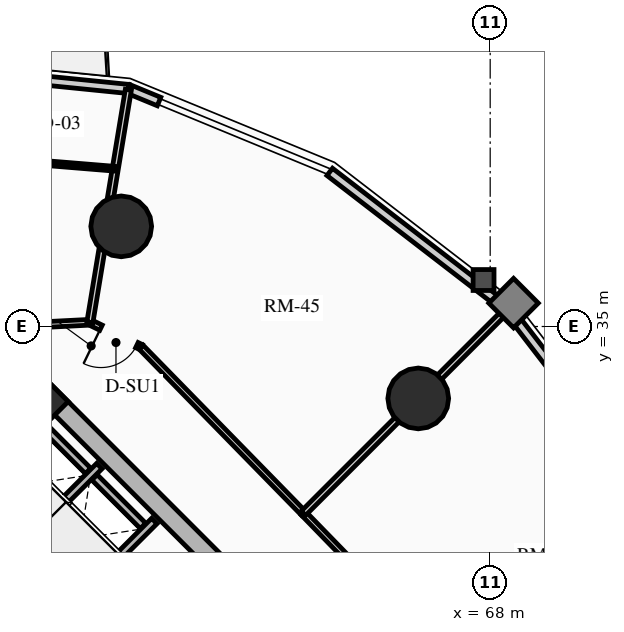
"""IFC4 building model, lengths in metres.
Left out: names, types, materials, properties, quantities, classifications, styles, units other than length and angle.
Written with IfcOpenShell. Run it as: python <this file> out.ifc"""

import sys

from ifc_helpers import new_model, si_unit, direction, frame, frame_2d, origin, origin_2d, place, context, subcontext, project, spatial, rectangle, circle, extrude, source, transform, mapped, element, fill, save


model = new_model("IFC4")
c1 = context("Model", 3, precision=1e-05, world=origin(), true_north=direction((0.0, 1.0)))
c2 = subcontext(c1, "Body", "Model", "MODEL_VIEW")
j1 = project(units=[si_unit("LENGTHUNIT", "METRE"), si_unit("PLANEANGLEUNIT", "RADIAN")], contexts=[c1])
p1 = place(None, origin())
s1 = spatial("IfcSite", under=j1, at=p1, CompositionType="ELEMENT")
p2 = place(p1, origin())
s2 = spatial("IfcBuilding", under=s1, at=p2, CompositionType="ELEMENT")
p3 = place(p2, frame((0.0, 0.0, 39.46)))
s3 = spatial("IfcBuildingStorey", under=s2, at=p3, CompositionType="ELEMENT", Elevation=39.46)
p4 = place(p3, frame((66.339, 23.227, 0.0), z_axis=(0.0, 0.0, 1.0), x_axis=(-0.707106781187, 0.707106781187, 0.0)))
e1 = element("IfcWall", 1, at=p4, inside=s3, PredefinedType="SHEAR", context=c2, shape_type="SweptSolid", body=[
    extrude(rectangle(XDim=14.3, YDim=0.5, at=frame_2d((7.15, 0.0))), origin(), (0.0, 0.0, 1.0), 2.91),
])
p5 = place(p3, frame((48.838, 25.596, 0.0), z_axis=(0.0, 0.0, 1.0), x_axis=(0.707106781187, 0.707106781187, 0.0)))
e2 = element("IfcWall", 2, at=p5, inside=s3, PredefinedType="SHEAR", context=c2, shape_type="SweptSolid", body=[
    extrude(rectangle(XDim=10.7, YDim=0.5, at=frame_2d((5.35, 0.0))), origin(), (0.0, 0.0, 1.0), 2.91),
])
m1 = source(origin(), c2, "Body", "SweptSolid", [
    extrude(rectangle(XDim=1.5, YDim=2.02, at=frame_2d((0.75, 1.01))), frame((0.0, 0.26, 0.0), z_axis=(0.0, -1.0, 0.0), x_axis=(1.0, 0.0, 0.0)), (0.0, 0.0, 1.0), 0.52),
])
p6 = place(p5, frame((4.6, 0.0, 0.0)))
e3 = element("IfcOpeningElement", 3, at=p6, cuts=e2, PredefinedType="OPENING", context=c2, shape_type="MappedRepresentation", body=[
    mapped(m1, transform((0.0, 0.0, 0.0), x_axis=(1.0, 0.0, 0.0), y_axis=(0.0, 1.0, 0.0), z_axis=(0.0, 0.0, 1.0), scale=1.0)),
])
p7 = place(p3, frame((63.662, 20.904, 0.0), z_axis=(0.0, 0.0, 1.0), x_axis=(-0.707106781187, 0.707106781187, 0.0)))
e4 = element("IfcWall", 4, at=p7, inside=s3, PredefinedType="SHEAR", context=c2, shape_type="SweptSolid", body=[
    extrude(rectangle(XDim=13.8, YDim=0.35, at=frame_2d((6.9, 0.0))), origin(), (0.0, 0.0, 1.0), 2.91),
])
m2 = source(origin(), c2, "Body", "SweptSolid", [
    extrude(rectangle(XDim=1.1, YDim=2.015, at=frame_2d((0.55, 1.007))), frame((0.0, 0.185, 0.0), z_axis=(0.0, -1.0, 0.0), x_axis=(1.0, 0.0, 0.0)), (0.0, 0.0, 1.0), 0.37),
])
p8 = place(p7, frame((10.025, 0.0, 0.0)))
e5 = element("IfcOpeningElement", 5, at=p8, cuts=e4, PredefinedType="OPENING", context=c2, shape_type="MappedRepresentation", body=[
    mapped(m2, transform((0.0, 0.0, 0.0), x_axis=(1.0, 0.0, 0.0), y_axis=(0.0, 1.0, 0.0), z_axis=(0.0, 0.0, 1.0), scale=1.0)),
])
p9 = place(p7, frame((12.025, 0.0, 0.0)))
e6 = element("IfcOpeningElement", 6, at=p9, cuts=e4, PredefinedType="OPENING", context=c2, shape_type="MappedRepresentation", body=[
    mapped(m2, transform((0.0, 0.0, 0.0), x_axis=(1.0, 0.0, 0.0), y_axis=(0.0, 1.0, 0.0), z_axis=(0.0, 0.0, 1.0), scale=1.0)),
])
m3 = source(origin(), c2, "Body", "SweptSolid", [
    extrude(rectangle(XDim=1.15, YDim=2.02, at=frame_2d((0.575, 1.01))), frame((0.0, 0.185, 0.0), z_axis=(0.0, -1.0, 0.0), x_axis=(1.0, 0.0, 0.0)), (0.0, 0.0, 1.0), 0.37),
])
p10 = place(p7, frame((5.33, 0.0, 0.0)))
e7 = element("IfcOpeningElement", 7, at=p10, cuts=e4, PredefinedType="OPENING", context=c2, shape_type="MappedRepresentation", body=[
    mapped(m3, transform((0.0, 0.0, 0.0), x_axis=(1.0, 0.0, 0.0), y_axis=(0.0, 1.0, 0.0), z_axis=(0.0, 0.0, 1.0), scale=1.0)),
])
p11 = place(p3, frame((56.294, 33.024, 0.0), z_axis=(0.0, 0.0, 1.0), x_axis=(0.707106781187, 0.707106781187, 0.0)))
e8 = element("IfcColumn", 8, at=p11, inside=s3, PredefinedType="COLUMN", context=c2, shape_type="SweptSolid", body=[
    extrude(rectangle(XDim=0.85, YDim=0.85, at=origin_2d()), origin(), (0.0, 0.0, 1.0), 2.91),
])
for number, where, z_axis, x_axis in (
    (9, (66.107, 33.107, 0.0), (0.0, 0.0, 1.0), (1.0, 0.0, 0.0)),
    (10, (58.291, 37.635, 0.0), (0.0, 0.0, 1.0), (1.0, 0.0, 0.0)),
):
    element("IfcColumn", number, at=place(p3, frame(where, z_axis=z_axis, x_axis=x_axis)), inside=s3, PredefinedType="USERDEFINED", context=c2, shape_type="SweptSolid", body=[
        extrude(circle(Radius=0.8, at=origin_2d()), origin(), (0.0, 0.0, 1.0), 2.91),
    ])
p12 = place(p3, frame((63.778, 39.068, 0.0), z_axis=(0.0, 0.0, 1.0), x_axis=(0.792020182601, -0.610494906082, 0.0)))
e11 = element("IfcWall", 11, at=p12, inside=s3, PredefinedType="SOLIDWALL", context=c2, shape_type="SweptSolid", body=[
    extrude(rectangle(XDim=5.911, YDim=0.24, at=frame_2d((2.956, 0.0))), origin(), (0.0, 0.0, 1.0), 2.073),
])
p13 = place(p3, frame((58.482, 41.251, 0.0), z_axis=(0.0, 0.0, 1.0), x_axis=(0.924556017656, -0.381046152345, 0.0)))
e12 = element("IfcWall", 12, at=p13, inside=s3, PredefinedType="SOLIDWALL", context=c2, shape_type="SweptSolid", body=[
    extrude(rectangle(XDim=0.87, YDim=0.24, at=frame_2d((0.435, 0.0))), origin(), (0.0, 0.0, 1.0), 2.073),
])
p14 = place(p3, frame((53.09, 41.794, 0.0), z_axis=(0.0, 0.0, 1.0), x_axis=(0.994968263437, -0.100190592135, 0.0)))
e13 = element("IfcWall", 13, at=p14, inside=s3, PredefinedType="SOLIDWALL", context=c2, shape_type="SweptSolid", body=[
    extrude(rectangle(XDim=5.419, YDim=0.24, at=frame_2d((2.71, 0.0))), origin(), (0.0, 0.0, 1.0), 2.073),
])
m4 = source(origin(), c2, "Body", "SweptSolid", [
    extrude(rectangle(XDim=1.15, YDim=2.005, at=frame_2d((0.575, 1.002))), frame((0.0, 0.13, 0.0), z_axis=(0.0, -1.0, 0.0), x_axis=(1.0, 0.0, 0.0)), (0.0, 0.0, 1.0), 0.26),
])
p15 = place(p14, frame((2.135, 0.0, 0.0)))
e14 = element("IfcOpeningElement", 14, at=p15, cuts=e13, PredefinedType="OPENING", context=c2, shape_type="MappedRepresentation", body=[
    mapped(m4, transform((0.0, 0.0, 0.0), x_axis=(1.0, 0.0, 0.0), y_axis=(0.0, 1.0, 0.0), z_axis=(0.0, 0.0, 1.0), scale=1.0)),
])
p16 = place(p3, frame((68.459, 35.459, 0.0), z_axis=(0.0, 0.0, 1.0), x_axis=(0.610494906082, -0.792020182601, 0.0)))
e15 = element("IfcWall", 15, at=p16, inside=s3, PredefinedType="SOLIDWALL", context=c2, shape_type="SweptSolid", body=[
    extrude(rectangle(XDim=5.911, YDim=0.24, at=frame_2d((2.956, 0.0))), origin(), (0.0, 0.0, 1.0), 2.073),
])
m5 = source(origin(), c2, "Body", "SweptSolid", [
    extrude(rectangle(XDim=2.2, YDim=1.35, at=frame_2d((1.1, 0.675))), frame((0.0, 0.13, 0.0), z_axis=(0.0, -1.0, 0.0), x_axis=(1.0, 0.0, 0.0)), (0.0, 0.0, 1.0), 0.26),
])
p17 = place(p16, frame((1.855, 0.0, 0.65)))
e16 = element("IfcOpeningElement", 16, at=p17, cuts=e15, PredefinedType="OPENING", context=c2, shape_type="MappedRepresentation", body=[
    mapped(m5, transform((0.0, 0.0, 0.0), x_axis=(1.0, 0.0, 0.0), y_axis=(0.0, 1.0, 0.0), z_axis=(0.0, 0.0, 1.0), scale=1.0)),
])
p18 = place(p3, frame((57.062, 27.781, 0.0), z_axis=(0.0, 0.0, 1.0), x_axis=(0.707106781187, 0.707106781187, 0.0)))
e17 = element("IfcWall", 17, at=p18, inside=s3, PredefinedType="SHEAR", context=c2, shape_type="SweptSolid", body=[
    extrude(rectangle(XDim=2.97, YDim=0.2, at=frame_2d((1.485, 0.0))), origin(), (0.0, 0.0, 1.0), 2.91),
])
p19 = place(p3, frame((55.615, 29.227, 0.0), z_axis=(0.0, 0.0, 1.0), x_axis=(0.707147878904, 0.70706568108, 0.0)))
e18 = element("IfcWall", 18, at=p19, inside=s3, PredefinedType="SHEAR", context=c2, shape_type="SweptSolid", body=[
    extrude(rectangle(XDim=2.97, YDim=0.2, at=frame_2d((1.485, 0.0))), origin(), (0.0, 0.0, 1.0), 2.91),
])
p20 = place(p3, frame((58.865, 29.754, 0.0), z_axis=(0.0, 0.0, 1.0), x_axis=(-0.707174411312, 0.707039144592, 0.0)))
e19 = element("IfcWall", 19, at=p20, inside=s3, PredefinedType="SHEAR", context=c2, shape_type="SweptSolid", body=[
    extrude(rectangle(XDim=1.805, YDim=0.2, at=frame_2d((0.902, 0.0))), origin(), (0.0, 0.0, 1.0), 2.91),
])
p21 = place(p3, frame((57.419, 31.2, 0.0), z_axis=(0.0, 0.0, 1.0), x_axis=(-0.707032117043, 0.707181437447, 0.0)))
e20 = element("IfcWall", 20, at=p21, inside=s3, PredefinedType="SHEAR", context=c2, shape_type="SweptSolid", body=[
    extrude(rectangle(XDim=1.635, YDim=0.2, at=frame_2d((0.817, 0.0))), origin(), (0.0, 0.0, 1.0), 2.91),
])
p22 = place(p3, frame((63.086, 30.086, 0.0), z_axis=(0.0, 0.0, 1.0), x_axis=(-0.699075897379, 0.715047473741, 0.0)))
e21 = element("IfcWall", 21, at=p22, inside=s3, PredefinedType="PARTITIONING", context=c2, shape_type="SweptSolid", body=[
    extrude(rectangle(XDim=6.114, YDim=0.15, at=frame_2d((3.057, 0.0))), origin(), (0.0, 0.0, 1.0), 2.159),
])
p23 = place(p3, frame((58.812, 34.458, 0.0), z_axis=(0.0, 0.0, 1.0), x_axis=(-0.899559490277, 0.436798264021, 0.0)))
e22 = element("IfcWall", 22, at=p23, inside=s3, PredefinedType="PARTITIONING", context=c2, shape_type="SweptSolid", body=[
    extrude(rectangle(XDim=1.495, YDim=0.15, at=frame_2d((0.748, 0.0))), origin(), (0.0, 0.0, 1.0), 2.205),
])
m6 = source(origin(), c2, "Body", "SweptSolid", [
    extrude(rectangle(XDim=1.05, YDim=2.015, at=frame_2d((0.525, 1.007))), frame((0.0, 0.085, 0.0), z_axis=(0.0, -1.0, 0.0), x_axis=(1.0, 0.0, 0.0)), (0.0, 0.0, 1.0), 0.17),
])
p24 = place(p23, frame((0.12, 0.0, 0.0)))
e23 = element("IfcOpeningElement", 23, at=p24, cuts=e22, PredefinedType="OPENING", context=c2, shape_type="MappedRepresentation", body=[
    mapped(m6, transform((0.0, 0.0, 0.0), x_axis=(1.0, 0.0, 0.0), y_axis=(0.0, 1.0, 0.0), z_axis=(0.0, 0.0, 1.0), scale=1.0)),
])
p25 = place(p3, frame((57.467, 35.111, 0.0), z_axis=(0.0, 0.0, 1.0), x_axis=(-0.998691757323, -0.051134859488, 0.0)))
e24 = element("IfcWall", 24, at=p25, inside=s3, PredefinedType="PARTITIONING", context=c2, shape_type="SweptSolid", body=[
    extrude(rectangle(XDim=1.485, YDim=0.15, at=frame_2d((0.742, 0.0))), origin(), (0.0, 0.0, 1.0), 2.159),
])
p26 = place(p3, frame((67.27, 25.78, 0.0), z_axis=(0.0, 0.0, 1.0), x_axis=(-0.696847842907, 0.717218992942, 0.0)))
e25 = element("IfcWall", 25, at=p26, inside=s3, PredefinedType="PARTITIONING", context=c2, shape_type="SweptSolid", body=[
    extrude(rectangle(XDim=6.004, YDim=0.15, at=frame_2d((3.002, 0.0))), origin(), (0.0, 0.0, 1.0), 2.635),
])
m7 = source(origin(), c2, "Body", "SweptSolid", [
    extrude(rectangle(XDim=1.0, YDim=2.015, at=frame_2d((0.5, 1.007))), frame((0.0, 0.085, 0.0), z_axis=(0.0, -1.0, 0.0), x_axis=(1.0, 0.0, 0.0)), (0.0, 0.0, 1.0), 0.17),
])
p27 = place(p26, frame((2.502, 0.0, 0.0)))
e26 = element("IfcOpeningElement", 26, at=p27, cuts=e25, PredefinedType="OPENING", context=c2, shape_type="MappedRepresentation", body=[
    mapped(m7, transform((0.0, 0.0, 0.0), x_axis=(1.0, 0.0, 0.0), y_axis=(0.0, 1.0, 0.0), z_axis=(0.0, 0.0, 1.0), scale=1.0)),
])
p28 = place(p3, frame((63.086, 30.086, 0.0), z_axis=(0.0, 0.0, 1.0), x_axis=(0.707106781187, 0.707106781187, 0.0)))
e27 = element("IfcWall", 27, at=p28, inside=s3, PredefinedType="PARTITIONING", context=c2, shape_type="SweptSolid", body=[
    extrude(rectangle(XDim=7.579, YDim=0.16, at=frame_2d((3.79, 0.0))), origin(), (0.0, 0.0, 1.0), 2.073),
])
p29 = place(p3, frame((57.467, 35.111, 0.0), z_axis=(0.0, 0.0, 1.0), x_axis=(0.163141505202, 0.986602680556, 0.0)))
e28 = element("IfcWall", 28, at=p29, inside=s3, PredefinedType="PARTITIONING", context=c2, shape_type="SweptSolid", body=[
    extrude(rectangle(XDim=6.203, YDim=0.16, at=frame_2d((3.102, 0.0))), origin(), (0.0, 0.0, 1.0), 2.073),
])
p30 = place(p3, frame((58.135, 39.15, 0.0), z_axis=(0.0, 0.0, 1.0), x_axis=(-0.996661360768, 0.081646383578, 0.0)))
e29 = element("IfcWall", 29, at=p30, inside=s3, PredefinedType="PARTITIONING", context=c2, shape_type="SweptSolid", body=[
    extrude(rectangle(XDim=4.073, YDim=0.125, at=frame_2d((2.036, 0.0))), origin(), (0.0, 0.0, 1.0), 2.635),
])
m8 = source(origin(), c2, "Body", "SweptSolid", [
    extrude(rectangle(XDim=0.9, YDim=2.005, at=frame_2d((0.45, 1.002))), frame((0.0, 0.073, 0.0), z_axis=(0.0, -1.0, 0.0), x_axis=(1.0, 0.0, 0.0)), (0.0, 0.0, 1.0), 0.145),
])
p31 = place(p30, frame((2.869, 0.0, 0.0)))
e30 = element("IfcOpeningElement", 30, at=p31, cuts=e29, PredefinedType="OPENING", context=c2, shape_type="MappedRepresentation", body=[
    mapped(m8, transform((0.0, 0.0, 0.0), x_axis=(1.0, 0.0, 0.0), y_axis=(0.0, 1.0, 0.0), z_axis=(0.0, 0.0, 1.0), scale=1.0)),
])
m9 = source(origin(), c2, "Body", "SweptSolid", [
    extrude(rectangle(XDim=1.05, YDim=2.015, at=frame_2d((0.525, 1.007))), frame((0.0, 0.025, 0.0), z_axis=(0.0, -1.0, 0.0), x_axis=(1.0, 0.0, 0.0)), (0.0, 0.0, 1.0), 0.05),
])
p32 = place(p24, origin())
e31 = element("IfcDoor", 31, at=p32, inside=s3, OperationType="SINGLE_SWING_RIGHT", PredefinedType="DOOR", context=c2, shape_type="MappedRepresentation", body=[
    mapped(m9, transform((0.0, 0.0, 0.0), x_axis=(1.0, 0.0, 0.0), y_axis=(0.0, 1.0, 0.0), z_axis=(0.0, 0.0, 1.0), scale=1.0)),
])
fill(e23, e31)
save(model, sys.argv[1])
